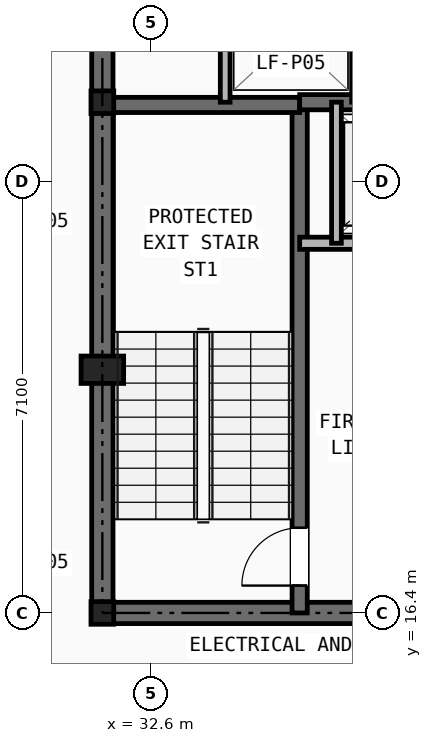
"""IFC4 building model, lengths in metres.
Left out: names, types, materials, properties, quantities, classifications, styles, units other than length and angle.
Written with IfcOpenShell. Run it as: python <this file> out.ifc"""

import sys

from ifc_helpers import new_model, si_unit, direction, frame, frame_2d, origin, origin_2d, place, context, subcontext, project, spatial, rectangle, i_section, extrude, element, fill, save


model = new_model("IFC4")
c1 = context("Model", 3, precision=1e-05, world=origin(), true_north=direction((0.0, 1.0)))
c2 = subcontext(c1, "Body", "Model", "MODEL_VIEW")
j1 = project(units=[si_unit("LENGTHUNIT", "METRE"), si_unit("PLANEANGLEUNIT", "RADIAN")], contexts=[c1])
p1 = place(None, origin())
s1 = spatial("IfcSite", under=j1, at=p1, CompositionType="ELEMENT")
p2 = place(p1, origin())
s2 = spatial("IfcBuilding", under=s1, at=p2, CompositionType="ELEMENT")
p3 = place(p2, frame((0.0, 0.0, 200.7)))
s3 = spatial("IfcBuildingStorey", under=s2, at=p3, CompositionType="ELEMENT", Elevation=200.7)
for number, where, z_axis, x_axis in (
    (1, (31.8, 16.4, 0.0), (0.0, 0.0, 1.0), (1.0, 0.0, 0.0)),
    (2, (31.8, 24.8, 0.0), (0.0, 0.0, 1.0), (1.0, 0.0, 0.0)),
):
    element("IfcColumn", number, at=place(p3, frame(where, z_axis=z_axis, x_axis=x_axis)), inside=s3, PredefinedType="COLUMN", context=c2, shape_type="SweptSolid", body=[
        extrude(i_section(OverallWidth=0.374, OverallDepth=0.372, WebThickness=0.016, FlangeThickness=0.026, at=origin_2d()), origin(), (0.0, 0.0, 1.0), 4.2),
    ])
p4 = place(p3, frame((31.8, 20.4, 0.0), z_axis=(0.0, 0.0, 1.0), x_axis=(1.0, 0.0, 0.0)))
e3 = element("IfcColumn", 3, at=p4, inside=s3, PredefinedType="PILASTER", context=c2, shape_type="SweptSolid", body=[
    extrude(rectangle(XDim=0.7, YDim=0.45, at=origin_2d()), origin(), (0.0, 0.0, 1.0), 4.2),
])
p5 = place(p3, frame((31.8, 16.4, 0.0), z_axis=(0.0, 0.0, 1.0), x_axis=(1.0, 0.0, 0.0)))
e4 = element("IfcWall", 4, at=p5, inside=s3, PredefinedType="SHEAR", context=c2, shape_type="SweptSolid", body=[
    extrude(rectangle(XDim=16.4, YDim=0.35, at=frame_2d((8.2, 0.0))), origin(), (0.0, 0.0, 1.0), 3.95),
])
p6 = place(p5, frame((7.75, 0.0, 0.0)))
e5 = element("IfcOpeningElement", 5, at=p6, cuts=e4, PredefinedType="OPENING", context=c2, shape_type="SweptSolid", body=[
    extrude(rectangle(XDim=0.9, YDim=2.1, at=frame_2d((0.45, 1.05))), frame((0.0, 0.185, 0.0), z_axis=(0.0, -1.0, 0.0), x_axis=(1.0, 0.0, 0.0)), (0.0, 0.0, 1.0), 0.37),
])
p7 = place(p5, frame((4.2, 0.0, 0.0)))
e6 = element("IfcOpeningElement", 6, at=p7, cuts=e4, PredefinedType="OPENING", context=c2, shape_type="SweptSolid", body=[
    extrude(rectangle(XDim=0.95, YDim=2.1, at=frame_2d((0.475, 1.05))), frame((0.0, 0.185, 0.0), z_axis=(0.0, -1.0, 0.0), x_axis=(1.0, 0.0, 0.0)), (0.0, 0.0, 1.0), 0.37),
])
p8 = place(p5, frame((10.6, 0.0, 0.0)))
e7 = element("IfcOpeningElement", 7, at=p8, cuts=e4, PredefinedType="OPENING", context=c2, shape_type="SweptSolid", body=[
    extrude(rectangle(XDim=0.95, YDim=2.1, at=frame_2d((0.475, 1.05))), frame((0.0, 0.185, 0.0), z_axis=(0.0, -1.0, 0.0), x_axis=(1.0, 0.0, 0.0)), (0.0, 0.0, 1.0), 0.37),
])
p9 = place(p3, frame((31.8, 16.4, 0.0), z_axis=(0.0, 0.0, 1.0), x_axis=(0.0, 1.0, 0.0)))
e8 = element("IfcWall", 8, at=p9, inside=s3, PredefinedType="SHEAR", context=c2, shape_type="SweptSolid", body=[
    extrude(rectangle(XDim=14.8, YDim=0.35, at=frame_2d((7.4, 0.0))), origin(), (0.0, 0.0, 1.0), 3.95),
])
p10 = place(p9, frame((11.0, 0.0, 0.0)))
e9 = element("IfcOpeningElement", 9, at=p10, cuts=e8, PredefinedType="OPENING", context=c2, shape_type="SweptSolid", body=[
    extrude(rectangle(XDim=1.1, YDim=2.15, at=frame_2d((0.55, 1.075))), frame((0.0, 0.185, 0.0), z_axis=(0.0, -1.0, 0.0), x_axis=(1.0, 0.0, 0.0)), (0.0, 0.0, 1.0), 0.37),
])
p11 = place(p3, frame((35.045, 16.4, 0.0), z_axis=(0.0, 0.0, 1.0), x_axis=(0.0, 1.0, 0.0)))
e10 = element("IfcWall", 10, at=p11, inside=s3, PredefinedType="SHEAR", context=c2, shape_type="SweptSolid", body=[
    extrude(rectangle(XDim=8.4, YDim=0.25, at=frame_2d((4.2, 0.0))), origin(), (0.0, 0.0, 1.0), 3.95),
])
p12 = place(p11, frame((0.45, 0.0, 0.0)))
e11 = element("IfcOpeningElement", 11, at=p12, cuts=e10, PredefinedType="OPENING", context=c2, shape_type="SweptSolid", body=[
    extrude(rectangle(XDim=0.95, YDim=2.1, at=frame_2d((0.475, 1.05))), frame((0.0, 0.135, 0.0), z_axis=(0.0, -1.0, 0.0), x_axis=(1.0, 0.0, 0.0)), (0.0, 0.0, 1.0), 0.27),
])
p13 = place(p3, frame((31.8, 24.755, 0.0), z_axis=(0.0, 0.0, 1.0), x_axis=(1.0, 0.0, 0.0)))
e12 = element("IfcWall", 12, at=p13, inside=s3, PredefinedType="SHEAR", context=c2, shape_type="SweptSolid", body=[
    extrude(rectangle(XDim=3.245, YDim=0.25, at=frame_2d((1.623, 0.0))), origin(), (0.0, 0.0, 1.0), 3.95),
])
p14 = place(p3, frame((35.045, 24.8, 0.0), z_axis=(0.0, 0.0, 1.0), x_axis=(1.0, 0.0, 0.0)))
e13 = element("IfcWall", 13, at=p14, inside=s3, PredefinedType="SHEAR", context=c2, shape_type="SweptSolid", body=[
    extrude(rectangle(XDim=9.91, YDim=0.25, at=frame_2d((4.955, 0.0))), origin(), (0.0, 0.0, 1.0), 3.95),
])
p15 = place(p3, frame((35.045, 22.48, 0.0), z_axis=(0.0, 0.0, 1.0), x_axis=(1.0, 0.0, 0.0)))
e14 = element("IfcWall", 14, at=p15, inside=s3, PredefinedType="SOLIDWALL", context=c2, shape_type="SweptSolid", body=[
    extrude(rectangle(XDim=9.91, YDim=0.2, at=frame_2d((4.955, 0.0))), origin(), (0.0, 0.0, 1.0), 3.95),
])
p16 = place(p15, frame((1.255, 0.0, 0.0)))
e15 = element("IfcOpeningElement", 15, at=p16, cuts=e14, PredefinedType="OPENING", context=c2, shape_type="SweptSolid", body=[
    extrude(rectangle(XDim=1.1, YDim=2.15, at=frame_2d((0.55, 1.075))), frame((0.0, 0.11, 0.0), z_axis=(0.0, -1.0, 0.0), x_axis=(1.0, 0.0, 0.0)), (0.0, 0.0, 1.0), 0.22),
])
p17 = place(p15, frame((7.555, 0.0, 0.0)))
e16 = element("IfcOpeningElement", 16, at=p17, cuts=e14, PredefinedType="OPENING", context=c2, shape_type="SweptSolid", body=[
    extrude(rectangle(XDim=1.1, YDim=2.15, at=frame_2d((0.55, 1.075))), frame((0.0, 0.11, 0.0), z_axis=(0.0, -1.0, 0.0), x_axis=(1.0, 0.0, 0.0)), (0.0, 0.0, 1.0), 0.22),
])
p18 = place(p15, frame((4.405, 0.0, 0.0)))
e17 = element("IfcOpeningElement", 17, at=p18, cuts=e14, PredefinedType="OPENING", context=c2, shape_type="SweptSolid", body=[
    extrude(rectangle(XDim=1.1, YDim=2.15, at=frame_2d((0.55, 1.075))), frame((0.0, 0.11, 0.0), z_axis=(0.0, -1.0, 0.0), x_axis=(1.0, 0.0, 0.0)), (0.0, 0.0, 1.0), 0.22),
])
p19 = place(p3, frame((35.65, 22.48, 0.0), z_axis=(0.0, 0.0, 1.0), x_axis=(0.0, 1.0, 0.0)))
e18 = element("IfcWall", 18, at=p19, inside=s3, PredefinedType="SOLIDWALL", context=c2, shape_type="SweptSolid", body=[
    extrude(rectangle(XDim=2.32, YDim=0.16, at=frame_2d((1.16, 0.0))), origin(), (0.0, 0.0, 1.0), 3.95),
])
for number, where, z_axis, x_axis in (
    (19, (33.82, 24.8, 0.0), (0.0, 0.0, 1.0), (0.0, 1.0, 0.0)),
    (20, (35.98, 24.8, 0.0), (0.0, 0.0, 1.0), (0.0, 1.0, 0.0)),
):
    element("IfcWall", number, at=place(p3, frame(where, z_axis=z_axis, x_axis=x_axis)), inside=s3, PredefinedType="SOLIDWALL", context=c2, shape_type="SweptSolid", body=[
        extrude(rectangle(XDim=2.08, YDim=0.16, at=frame_2d((1.04, 0.0))), origin(), (0.0, 0.0, 1.0), 3.95),
    ])
p20 = place(p12, origin())
e21 = element("IfcDoor", 21, at=p20, inside=s3, OperationType="SINGLE_SWING_LEFT", PredefinedType="DOOR", context=c2, shape_type="SweptSolid", body=[
    extrude(rectangle(XDim=0.95, YDim=2.1, at=frame_2d((0.475, 1.05))), frame((0.0, 0.025, 0.0), z_axis=(0.0, -1.0, 0.0), x_axis=(1.0, 0.0, 0.0)), (0.0, 0.0, 1.0), 0.05),
])
fill(e11, e21)
save(model, sys.argv[1])
